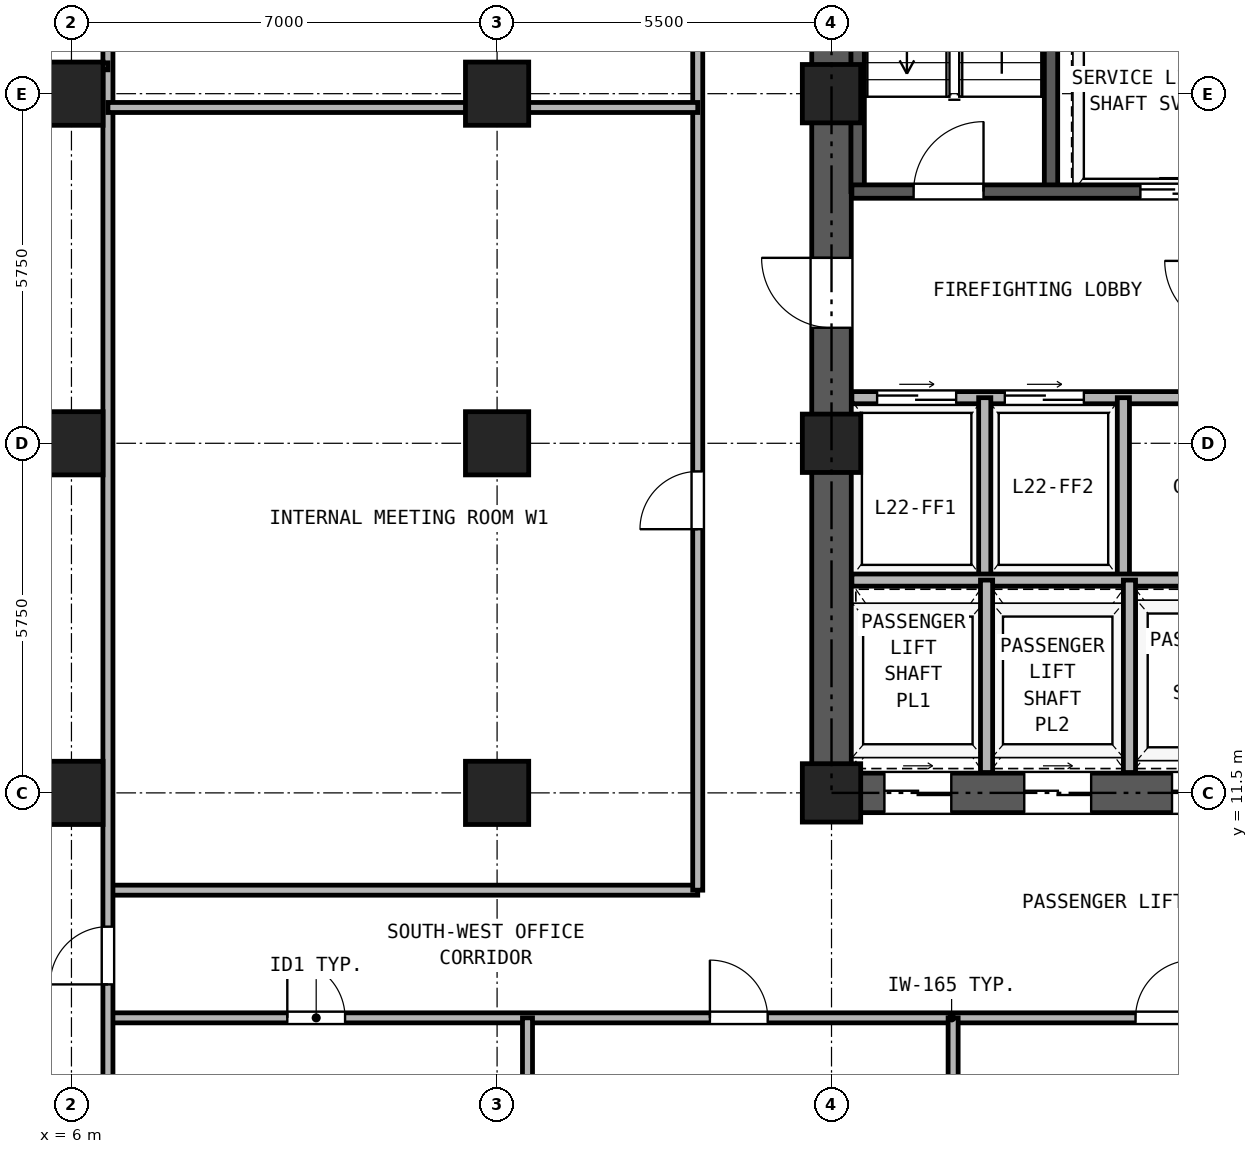
"""IFC4 building model, lengths in metres.
Left out: names, types, materials, properties, quantities, classifications, styles, units other than length and angle.
Written with IfcOpenShell. Run it as: python <this file> out.ifc"""

import sys

from ifc_helpers import new_model, si_unit, direction, frame, frame_2d, origin, origin_2d, place, context, subcontext, project, spatial, rectangle, hollow_rectangle, extrude, source, transform, mapped, element, fill, save


model = new_model("IFC4")
c1 = context("Model", 3, precision=1e-05, world=origin(), true_north=direction((0.0, 1.0)))
c2 = subcontext(c1, "Body", "Model", "MODEL_VIEW")
j1 = project(units=[si_unit("LENGTHUNIT", "METRE"), si_unit("PLANEANGLEUNIT", "RADIAN")], contexts=[c1])
p1 = place(None, origin())
s1 = spatial("IfcSite", under=j1, at=p1, CompositionType="ELEMENT")
p2 = place(p1, origin())
s2 = spatial("IfcBuilding", under=s1, at=p2, CompositionType="ELEMENT")
p3 = place(p2, frame((0.0, 0.0, 84.6)))
s3 = spatial("IfcBuildingStorey", under=s2, at=p3, CompositionType="ELEMENT", Elevation=84.6)
m1 = source(origin(), c2, "Body", "SweptSolid", [
    extrude(hollow_rectangle(XDim=1.04, YDim=1.04, WallThickness=0.065, at=origin_2d()), origin(), (0.0, 0.0, 1.0), 3.24),
])
for number, where, z_axis, x_axis in (
    (1, (6.0, 11.5, 0.0), (0.0, 0.0, 1.0), (1.0, 0.0, 0.0)),
    (2, (6.0, 17.25, 0.0), (0.0, 0.0, 1.0), (1.0, 0.0, 0.0)),
    (3, (6.0, 23.0, 0.0), (0.0, 0.0, 1.0), (1.0, 0.0, 0.0)),
    (4, (13.0, 11.5, 0.0), (0.0, 0.0, 1.0), (1.0, 0.0, 0.0)),
    (5, (13.0, 17.25, 0.0), (0.0, 0.0, 1.0), (1.0, 0.0, 0.0)),
    (6, (13.0, 23.0, 0.0), (0.0, 0.0, 1.0), (1.0, 0.0, 0.0)),
):
    element("IfcColumn", number, at=place(p3, frame(where, z_axis=z_axis, x_axis=x_axis)), inside=s3, PredefinedType="COLUMN", context=c2, shape_type="MappedRepresentation", body=[
        mapped(m1, transform((0.0, 0.0, 0.0), x_axis=(1.0, 0.0, 0.0), y_axis=(0.0, 1.0, 0.0), z_axis=(0.0, 0.0, 1.0), scale=1.0)),
    ])
m2 = source(origin(), c2, "Body", "SweptSolid", [
    extrude(hollow_rectangle(XDim=0.96, YDim=0.96, WallThickness=0.06, at=origin_2d()), origin(), (0.0, 0.0, 1.0), 3.24),
])
for number, where, z_axis, x_axis in (
    (7, (18.5, 11.5, 0.0), (0.0, 0.0, 1.0), (1.0, 0.0, 0.0)),
    (8, (18.5, 17.25, 0.0), (0.0, 0.0, 1.0), (1.0, 0.0, 0.0)),
    (9, (18.5, 23.0, 0.0), (0.0, 0.0, 1.0), (1.0, 0.0, 0.0)),
):
    element("IfcColumn", number, at=place(p3, frame(where, z_axis=z_axis, x_axis=x_axis)), inside=s3, PredefinedType="COLUMN", context=c2, shape_type="MappedRepresentation", body=[
        mapped(m2, transform((0.0, 0.0, 0.0), x_axis=(1.0, 0.0, 0.0), y_axis=(0.0, 1.0, 0.0), z_axis=(0.0, 0.0, 1.0), scale=1.0)),
    ])
p4 = place(p3, frame((18.175, 11.5, 0.0), z_axis=(0.0, 0.0, 1.0), x_axis=(1.0, 0.0, 0.0)))
e10 = element("IfcWall", 10, at=p4, inside=s3, PredefinedType="SHEAR", context=c2, shape_type="SweptSolid", body=[
    extrude(rectangle(XDim=10.65, YDim=0.65, at=frame_2d((5.325, 0.0))), origin(), (0.0, 0.0, 1.0), 3.24),
])
p5 = place(p4, frame((1.195, 0.0, 0.0)))
e11 = element("IfcOpeningElement", 11, at=p5, cuts=e10, PredefinedType="OPENING", context=c2, shape_type="SweptSolid", body=[
    extrude(rectangle(XDim=1.1, YDim=2.25, at=frame_2d((0.55, 1.125))), frame((0.0, 0.335, 0.0), z_axis=(0.0, -1.0, 0.0), x_axis=(1.0, 0.0, 0.0)), (0.0, 0.0, 1.0), 0.67),
])
p6 = place(p4, frame((3.495, 0.0, 0.0)))
e12 = element("IfcOpeningElement", 12, at=p6, cuts=e10, PredefinedType="OPENING", context=c2, shape_type="SweptSolid", body=[
    extrude(rectangle(XDim=1.1, YDim=2.25, at=frame_2d((0.55, 1.125))), frame((0.0, 0.335, 0.0), z_axis=(0.0, -1.0, 0.0), x_axis=(1.0, 0.0, 0.0)), (0.0, 0.0, 1.0), 0.67),
])
p7 = place(p4, frame((5.925, 0.0, 0.0)))
e13 = element("IfcOpeningElement", 13, at=p7, cuts=e10, PredefinedType="OPENING", context=c2, shape_type="SweptSolid", body=[
    extrude(rectangle(XDim=1.1, YDim=2.25, at=frame_2d((0.55, 1.125))), frame((0.0, 0.335, 0.0), z_axis=(0.0, -1.0, 0.0), x_axis=(1.0, 0.0, 0.0)), (0.0, 0.0, 1.0), 0.67),
])
p8 = place(p4, frame((8.325, 0.0, 0.0)))
e14 = element("IfcOpeningElement", 14, at=p8, cuts=e10, PredefinedType="OPENING", context=c2, shape_type="SweptSolid", body=[
    extrude(rectangle(XDim=1.1, YDim=2.25, at=frame_2d((0.55, 1.125))), frame((0.0, 0.335, 0.0), z_axis=(0.0, -1.0, 0.0), x_axis=(1.0, 0.0, 0.0)), (0.0, 0.0, 1.0), 0.67),
])
p9 = place(p3, frame((18.5, 11.825, 0.0), z_axis=(0.0, 0.0, 1.0), x_axis=(0.0, 1.0, 0.0)))
e15 = element("IfcWall", 15, at=p9, inside=s3, PredefinedType="SHEAR", context=c2, shape_type="SweptSolid", body=[
    extrude(rectangle(XDim=16.6, YDim=0.65, at=frame_2d((8.3, 0.0))), origin(), (0.0, 0.0, 1.0), 3.24),
])
p10 = place(p9, frame((7.325, 0.0, 0.0)))
e16 = element("IfcOpeningElement", 16, at=p10, cuts=e15, PredefinedType="OPENING", context=c2, shape_type="SweptSolid", body=[
    extrude(rectangle(XDim=1.15, YDim=2.2, at=frame_2d((0.575, 1.1))), frame((0.0, 0.335, 0.0), z_axis=(0.0, -1.0, 0.0), x_axis=(1.0, 0.0, 0.0)), (0.0, 0.0, 1.0), 0.67),
])
for number, where, z_axis, x_axis in (
    (17, (18.93, 21.39, 0.0), (0.0, 0.0, 1.0), (0.0, 1.0, 0.0)),
    (18, (22.11, 21.39, 0.0), (0.0, 0.0, 1.0), (0.0, 1.0, 0.0)),
):
    element("IfcWall", number, at=place(p3, frame(where, z_axis=z_axis, x_axis=x_axis)), inside=s3, PredefinedType="SOLIDWALL", context=c2, shape_type="SweptSolid", body=[
        extrude(rectangle(XDim=7.11, YDim=0.22, at=frame_2d((3.555, 0.0))), origin(), (0.0, 0.0, 1.0), 3.24),
    ])
p11 = place(p3, frame((18.835, 21.39, 0.0), z_axis=(0.0, 0.0, 1.0), x_axis=(1.0, 0.0, 0.0)))
e19 = element("IfcWall", 19, at=p11, inside=s3, PredefinedType="SOLIDWALL", context=c2, shape_type="SweptSolid", body=[
    extrude(rectangle(XDim=6.295, YDim=0.22, at=frame_2d((3.147, 0.0))), origin(), (0.0, 0.0, 1.0), 3.24),
])
p12 = place(p11, frame((1.015, 0.0, 0.0)))
e20 = element("IfcOpeningElement", 20, at=p12, cuts=e19, PredefinedType="OPENING", context=c2, shape_type="SweptSolid", body=[
    extrude(rectangle(XDim=1.15, YDim=2.2, at=frame_2d((0.575, 1.1))), frame((0.0, 0.12, 0.0), z_axis=(0.0, -1.0, 0.0), x_axis=(1.0, 0.0, 0.0)), (0.0, 0.0, 1.0), 0.24),
])
p13 = place(p11, frame((4.745, 0.0, 0.0)))
e21 = element("IfcOpeningElement", 21, at=p13, cuts=e19, PredefinedType="OPENING", context=c2, shape_type="SweptSolid", body=[
    extrude(rectangle(XDim=1.1, YDim=2.25, at=frame_2d((0.55, 1.125))), frame((0.0, 0.12, 0.0), z_axis=(0.0, -1.0, 0.0), x_axis=(1.0, 0.0, 0.0)), (0.0, 0.0, 1.0), 0.24),
])
p14 = place(p3, frame((18.835, 18.0, 0.0), z_axis=(0.0, 0.0, 1.0), x_axis=(1.0, 0.0, 0.0)))
e22 = element("IfcWall", 22, at=p14, inside=s3, PredefinedType="PARTITIONING", context=c2, shape_type="SweptSolid", body=[
    extrude(rectangle(XDim=9.33, YDim=0.2, at=frame_2d((4.665, 0.0))), origin(), (0.0, 0.0, 1.0), 3.24),
])
p15 = place(p14, frame((0.415, 0.0, 0.0)))
e23 = element("IfcOpeningElement", 23, at=p15, cuts=e22, PredefinedType="OPENING", context=c2, shape_type="SweptSolid", body=[
    extrude(rectangle(XDim=1.3, YDim=2.3, at=frame_2d((0.65, 1.15))), frame((0.0, 0.11, 0.0), z_axis=(0.0, -1.0, 0.0), x_axis=(1.0, 0.0, 0.0)), (0.0, 0.0, 1.0), 0.22),
])
p16 = place(p14, frame((2.515, 0.0, 0.0)))
e24 = element("IfcOpeningElement", 24, at=p16, cuts=e22, PredefinedType="OPENING", context=c2, shape_type="SweptSolid", body=[
    extrude(rectangle(XDim=1.3, YDim=2.3, at=frame_2d((0.65, 1.15))), frame((0.0, 0.11, 0.0), z_axis=(0.0, -1.0, 0.0), x_axis=(1.0, 0.0, 0.0)), (0.0, 0.0, 1.0), 0.22),
])
p17 = place(p14, frame((7.015, 0.0, 0.0)))
e25 = element("IfcOpeningElement", 25, at=p17, cuts=e22, PredefinedType="OPENING", context=c2, shape_type="SweptSolid", body=[
    extrude(rectangle(XDim=1.0, YDim=2.15, at=frame_2d((0.5, 1.075))), frame((0.0, 0.11, 0.0), z_axis=(0.0, -1.0, 0.0), x_axis=(1.0, 0.0, 0.0)), (0.0, 0.0, 1.0), 0.22),
])
for number, where, z_axis, x_axis in (
    (26, (21.02, 15.0, 0.0), (0.0, 0.0, 1.0), (0.0, 1.0, 0.0)),
    (27, (23.3, 15.0, 0.0), (0.0, 0.0, 1.0), (0.0, 1.0, 0.0)),
):
    element("IfcWall", number, at=place(p3, frame(where, z_axis=z_axis, x_axis=x_axis)), inside=s3, PredefinedType="PARTITIONING", context=c2, shape_type="SweptSolid", body=[
        extrude(rectangle(XDim=3.0, YDim=0.2, at=frame_2d((1.5, 0.0))), origin(), (0.0, 0.0, 1.0), 3.24),
    ])
p18 = place(p3, frame((18.835, 15.0, 0.0), z_axis=(0.0, 0.0, 1.0), x_axis=(1.0, 0.0, 0.0)))
e28 = element("IfcWall", 28, at=p18, inside=s3, PredefinedType="PARTITIONING", context=c2, shape_type="SweptSolid", body=[
    extrude(rectangle(XDim=9.33, YDim=0.2, at=frame_2d((4.665, 0.0))), origin(), (0.0, 0.0, 1.0), 3.24),
])
for number, where, z_axis, x_axis in (
    (29, (21.05, 11.835, 0.0), (0.0, 0.0, 1.0), (0.0, 1.0, 0.0)),
    (30, (23.4, 11.835, 0.0), (0.0, 0.0, 1.0), (0.0, 1.0, 0.0)),
):
    element("IfcWall", number, at=place(p3, frame(where, z_axis=z_axis, x_axis=x_axis)), inside=s3, PredefinedType="PARTITIONING", context=c2, shape_type="SweptSolid", body=[
        extrude(rectangle(XDim=3.165, YDim=0.2, at=frame_2d((1.583, 0.0))), origin(), (0.0, 0.0, 1.0), 3.24),
    ])
p19 = place(p3, frame((6.6, 7.8, 0.0), z_axis=(0.0, 0.0, 1.0), x_axis=(1.0, 0.0, 0.0)))
e31 = element("IfcWall", 31, at=p19, inside=s3, PredefinedType="PARTITIONING", context=c2, shape_type="SweptSolid", body=[
    extrude(rectangle(XDim=33.8, YDim=0.165, at=frame_2d((16.9, 0.0))), origin(), (0.0, 0.0, 1.0), 3.24),
])
p20 = place(p19, frame((2.95, 0.0, 0.0)))
e32 = element("IfcOpeningElement", 32, at=p20, cuts=e31, PredefinedType="OPENING", context=c2, shape_type="SweptSolid", body=[
    extrude(rectangle(XDim=0.95, YDim=2.15, at=frame_2d((0.475, 1.075))), frame((0.0, 0.093, 0.0), z_axis=(0.0, -1.0, 0.0), x_axis=(1.0, 0.0, 0.0)), (0.0, 0.0, 1.0), 0.185),
])
p21 = place(p19, frame((9.9, 0.0, 0.0)))
e33 = element("IfcOpeningElement", 33, at=p21, cuts=e31, PredefinedType="OPENING", context=c2, shape_type="SweptSolid", body=[
    extrude(rectangle(XDim=0.95, YDim=2.15, at=frame_2d((0.475, 1.075))), frame((0.0, 0.093, 0.0), z_axis=(0.0, -1.0, 0.0), x_axis=(1.0, 0.0, 0.0)), (0.0, 0.0, 1.0), 0.185),
])
p22 = place(p19, frame((16.9, 0.0, 0.0)))
e34 = element("IfcOpeningElement", 34, at=p22, cuts=e31, PredefinedType="OPENING", context=c2, shape_type="SweptSolid", body=[
    extrude(rectangle(XDim=0.95, YDim=2.15, at=frame_2d((0.475, 1.075))), frame((0.0, 0.093, 0.0), z_axis=(0.0, -1.0, 0.0), x_axis=(1.0, 0.0, 0.0)), (0.0, 0.0, 1.0), 0.185),
])
p23 = place(p19, frame((23.4, 0.0, 0.0)))
e35 = element("IfcOpeningElement", 35, at=p23, cuts=e31, PredefinedType="OPENING", context=c2, shape_type="SweptSolid", body=[
    extrude(rectangle(XDim=0.95, YDim=2.15, at=frame_2d((0.475, 1.075))), frame((0.0, 0.093, 0.0), z_axis=(0.0, -1.0, 0.0), x_axis=(1.0, 0.0, 0.0)), (0.0, 0.0, 1.0), 0.185),
])
p24 = place(p19, frame((28.25, 0.0, 0.0)))
e36 = element("IfcOpeningElement", 36, at=p24, cuts=e31, PredefinedType="OPENING", context=c2, shape_type="SweptSolid", body=[
    extrude(rectangle(XDim=0.92, YDim=2.1, at=frame_2d((0.46, 1.05))), frame((0.0, 0.093, 0.0), z_axis=(0.0, -1.0, 0.0), x_axis=(1.0, 0.0, 0.0)), (0.0, 0.0, 1.0), 0.185),
])
p25 = place(p19, frame((31.7, 0.0, 0.0)))
e37 = element("IfcOpeningElement", 37, at=p25, cuts=e31, PredefinedType="OPENING", context=c2, shape_type="SweptSolid", body=[
    extrude(rectangle(XDim=0.92, YDim=2.1, at=frame_2d((0.46, 1.05))), frame((0.0, 0.093, 0.0), z_axis=(0.0, -1.0, 0.0), x_axis=(1.0, 0.0, 0.0)), (0.0, 0.0, 1.0), 0.185),
])
p26 = place(p3, frame((6.6, 9.9, 0.0), z_axis=(0.0, 0.0, 1.0), x_axis=(1.0, 0.0, 0.0)))
e38 = element("IfcWall", 38, at=p26, inside=s3, PredefinedType="PARTITIONING", context=c2, shape_type="SweptSolid", body=[
    extrude(rectangle(XDim=9.7, YDim=0.165, at=frame_2d((4.85, 0.0))), origin(), (0.0, 0.0, 1.0), 3.24),
])
p27 = place(p3, frame((16.3, 9.9, 0.0), z_axis=(0.0, 0.0, 1.0), x_axis=(0.0, 1.0, 0.0)))
e39 = element("IfcWall", 39, at=p27, inside=s3, PredefinedType="PARTITIONING", context=c2, shape_type="SweptSolid", body=[
    extrude(rectangle(XDim=19.95, YDim=0.165, at=frame_2d((9.975, 0.0))), origin(), (0.0, 0.0, 1.0), 3.24),
])
p28 = place(p27, frame((5.937, 0.0, 0.0)))
e40 = element("IfcOpeningElement", 40, at=p28, cuts=e39, PredefinedType="OPENING", context=c2, shape_type="SweptSolid", body=[
    extrude(rectangle(XDim=0.95, YDim=2.15, at=frame_2d((0.475, 1.075))), frame((0.0, 0.093, 0.0), z_axis=(0.0, -1.0, 0.0), x_axis=(1.0, 0.0, 0.0)), (0.0, 0.0, 1.0), 0.185),
])
p29 = place(p27, frame((15.911, 0.0, 0.0)))
e41 = element("IfcOpeningElement", 41, at=p29, cuts=e39, PredefinedType="OPENING", context=c2, shape_type="SweptSolid", body=[
    extrude(rectangle(XDim=0.95, YDim=2.15, at=frame_2d((0.475, 1.075))), frame((0.0, 0.093, 0.0), z_axis=(0.0, -1.0, 0.0), x_axis=(1.0, 0.0, 0.0)), (0.0, 0.0, 1.0), 0.185),
])
p30 = place(p3, frame((6.6, 0.16, 0.0), z_axis=(0.0, 0.0, 1.0), x_axis=(0.0, 1.0, 0.0)))
e42 = element("IfcWall", 42, at=p30, inside=s3, PredefinedType="PARTITIONING", context=c2, shape_type="SweptSolid", body=[
    extrude(rectangle(XDim=40.18, YDim=0.165, at=frame_2d((20.09, 0.0))), origin(), (0.0, 0.0, 1.0), 3.24),
])
p31 = place(p30, frame((8.19, 0.0, 0.0)))
e43 = element("IfcOpeningElement", 43, at=p31, cuts=e42, PredefinedType="OPENING", context=c2, shape_type="SweptSolid", body=[
    extrude(rectangle(XDim=0.95, YDim=2.15, at=frame_2d((0.475, 1.075))), frame((0.0, 0.093, 0.0), z_axis=(0.0, -1.0, 0.0), x_axis=(1.0, 0.0, 0.0)), (0.0, 0.0, 1.0), 0.185),
])
p32 = place(p30, frame((30.24, 0.0, 0.0)))
e44 = element("IfcOpeningElement", 44, at=p32, cuts=e42, PredefinedType="OPENING", context=c2, shape_type="SweptSolid", body=[
    extrude(rectangle(XDim=0.95, YDim=2.15, at=frame_2d((0.475, 1.075))), frame((0.0, 0.093, 0.0), z_axis=(0.0, -1.0, 0.0), x_axis=(1.0, 0.0, 0.0)), (0.0, 0.0, 1.0), 0.185),
])
for number, where, z_axis, x_axis in (
    (45, (13.5, 0.16, 0.0), (0.0, 0.0, 1.0), (0.0, 1.0, 0.0)),
    (46, (20.5, 0.16, 0.0), (0.0, 0.0, 1.0), (0.0, 1.0, 0.0)),
):
    element("IfcWall", number, at=place(p3, frame(where, z_axis=z_axis, x_axis=x_axis)), inside=s3, PredefinedType="PARTITIONING", context=c2, shape_type="SweptSolid", body=[
        extrude(rectangle(XDim=7.64, YDim=0.165, at=frame_2d((3.82, 0.0))), origin(), (0.0, 0.0, 1.0), 3.24),
    ])
p33 = place(p3, frame((0.16, 23.45, 0.0), z_axis=(0.0, 0.0, 1.0), x_axis=(1.0, 0.0, 0.0)))
e47 = element("IfcWall", 47, at=p33, inside=s3, PredefinedType="PARTITIONING", context=c2, shape_type="SweptSolid", body=[
    extrude(rectangle(XDim=6.44, YDim=0.115, at=frame_2d((3.22, 0.0))), origin(), (0.0, 0.0, 1.0), 3.24),
])
p34 = place(p3, frame((6.6, 22.773, 0.0), z_axis=(0.0, 0.0, 1.0), x_axis=(1.0, 0.0, 0.0)))
e48 = element("IfcWall", 48, at=p34, inside=s3, PredefinedType="PARTITIONING", context=c2, shape_type="SweptSolid", body=[
    extrude(rectangle(XDim=9.7, YDim=0.165, at=frame_2d((4.85, 0.0))), origin(), (0.0, 0.0, 1.0), 2.459),
])
p35 = place(p12, frame((1.15, 0.0, 0.0), z_axis=(0.0, 0.0, 1.0), x_axis=(-1.0, 0.0, 0.0)))
e49 = element("IfcDoor", 49, at=p35, inside=s3, OperationType="SINGLE_SWING_RIGHT", PredefinedType="DOOR", context=c2, shape_type="SweptSolid", body=[
    extrude(rectangle(XDim=1.15, YDim=2.2, at=frame_2d((0.575, 1.1))), frame((0.0, 0.025, 0.0), z_axis=(0.0, -1.0, 0.0), x_axis=(1.0, 0.0, 0.0)), (0.0, 0.0, 1.0), 0.05),
])
fill(e20, e49)
p36 = place(p13, frame((1.1, 0.0, 0.0), z_axis=(0.0, 0.0, 1.0), x_axis=(-1.0, 0.0, 0.0)))
e50 = element("IfcDoor", 50, at=p36, inside=s3, OperationType="DOUBLE_DOOR_SLIDING", PredefinedType="DOOR", context=c2, shape_type="SweptSolid", body=[
    extrude(rectangle(XDim=1.1, YDim=2.25, at=frame_2d((0.55, 1.125))), frame((0.0, 0.025, 0.0), z_axis=(0.0, -1.0, 0.0), x_axis=(1.0, 0.0, 0.0)), (0.0, 0.0, 1.0), 0.05),
])
fill(e21, e50)
p37 = place(p15, origin())
e51 = element("IfcDoor", 51, at=p37, inside=s3, OperationType="DOUBLE_DOOR_SLIDING", PredefinedType="DOOR", context=c2, shape_type="SweptSolid", body=[
    extrude(rectangle(XDim=1.3, YDim=2.3, at=frame_2d((0.65, 1.15))), frame((0.0, 0.025, 0.0), z_axis=(0.0, -1.0, 0.0), x_axis=(1.0, 0.0, 0.0)), (0.0, 0.0, 1.0), 0.05),
])
fill(e23, e51)
p38 = place(p16, origin())
e52 = element("IfcDoor", 52, at=p38, inside=s3, OperationType="DOUBLE_DOOR_SLIDING", PredefinedType="DOOR", context=c2, shape_type="SweptSolid", body=[
    extrude(rectangle(XDim=1.3, YDim=2.3, at=frame_2d((0.65, 1.15))), frame((0.0, 0.025, 0.0), z_axis=(0.0, -1.0, 0.0), x_axis=(1.0, 0.0, 0.0)), (0.0, 0.0, 1.0), 0.05),
])
fill(e24, e52)
p39 = place(p10, frame((1.15, 0.0, 0.0), z_axis=(0.0, 0.0, 1.0), x_axis=(-1.0, 0.0, 0.0)))
e53 = element("IfcDoor", 53, at=p39, inside=s3, OperationType="SINGLE_SWING_RIGHT", PredefinedType="DOOR", context=c2, shape_type="SweptSolid", body=[
    extrude(rectangle(XDim=1.15, YDim=2.2, at=frame_2d((0.575, 1.1))), frame((0.0, 0.025, 0.0), z_axis=(0.0, -1.0, 0.0), x_axis=(1.0, 0.0, 0.0)), (0.0, 0.0, 1.0), 0.05),
])
fill(e16, e53)
p40 = place(p5, frame((1.1, 0.0, 0.0), z_axis=(0.0, 0.0, 1.0), x_axis=(-1.0, 0.0, 0.0)))
e54 = element("IfcDoor", 54, at=p40, inside=s3, OperationType="DOUBLE_DOOR_SLIDING", PredefinedType="DOOR", context=c2, shape_type="SweptSolid", body=[
    extrude(rectangle(XDim=1.1, YDim=2.25, at=frame_2d((0.55, 1.125))), frame((0.0, 0.025, 0.0), z_axis=(0.0, -1.0, 0.0), x_axis=(1.0, 0.0, 0.0)), (0.0, 0.0, 1.0), 0.05),
])
fill(e11, e54)
p41 = place(p6, frame((1.1, 0.0, 0.0), z_axis=(0.0, 0.0, 1.0), x_axis=(-1.0, 0.0, 0.0)))
e55 = element("IfcDoor", 55, at=p41, inside=s3, OperationType="DOUBLE_DOOR_SLIDING", PredefinedType="DOOR", context=c2, shape_type="SweptSolid", body=[
    extrude(rectangle(XDim=1.1, YDim=2.25, at=frame_2d((0.55, 1.125))), frame((0.0, 0.025, 0.0), z_axis=(0.0, -1.0, 0.0), x_axis=(1.0, 0.0, 0.0)), (0.0, 0.0, 1.0), 0.05),
])
fill(e12, e55)
p42 = place(p7, frame((1.1, 0.0, 0.0), z_axis=(0.0, 0.0, 1.0), x_axis=(-1.0, 0.0, 0.0)))
e56 = element("IfcDoor", 56, at=p42, inside=s3, OperationType="DOUBLE_DOOR_SLIDING", PredefinedType="DOOR", context=c2, shape_type="SweptSolid", body=[
    extrude(rectangle(XDim=1.1, YDim=2.25, at=frame_2d((0.55, 1.125))), frame((0.0, 0.025, 0.0), z_axis=(0.0, -1.0, 0.0), x_axis=(1.0, 0.0, 0.0)), (0.0, 0.0, 1.0), 0.05),
])
fill(e13, e56)
p43 = place(p20, frame((0.95, 0.0, 0.0), z_axis=(0.0, 0.0, 1.0), x_axis=(-1.0, 0.0, 0.0)))
e57 = element("IfcDoor", 57, at=p43, inside=s3, OperationType="SINGLE_SWING_LEFT", PredefinedType="DOOR", context=c2, shape_type="SweptSolid", body=[
    extrude(rectangle(XDim=0.95, YDim=2.15, at=frame_2d((0.475, 1.075))), frame((0.0, 0.025, 0.0), z_axis=(0.0, -1.0, 0.0), x_axis=(1.0, 0.0, 0.0)), (0.0, 0.0, 1.0), 0.05),
])
fill(e32, e57)
p44 = place(p21, frame((0.95, 0.0, 0.0), z_axis=(0.0, 0.0, 1.0), x_axis=(-1.0, 0.0, 0.0)))
e58 = element("IfcDoor", 58, at=p44, inside=s3, OperationType="SINGLE_SWING_LEFT", PredefinedType="DOOR", context=c2, shape_type="SweptSolid", body=[
    extrude(rectangle(XDim=0.95, YDim=2.15, at=frame_2d((0.475, 1.075))), frame((0.0, 0.025, 0.0), z_axis=(0.0, -1.0, 0.0), x_axis=(1.0, 0.0, 0.0)), (0.0, 0.0, 1.0), 0.05),
])
fill(e33, e58)
p45 = place(p22, frame((0.95, 0.0, 0.0), z_axis=(0.0, 0.0, 1.0), x_axis=(-1.0, 0.0, 0.0)))
e59 = element("IfcDoor", 59, at=p45, inside=s3, OperationType="SINGLE_SWING_RIGHT", PredefinedType="DOOR", context=c2, shape_type="SweptSolid", body=[
    extrude(rectangle(XDim=0.95, YDim=2.15, at=frame_2d((0.475, 1.075))), frame((0.0, 0.025, 0.0), z_axis=(0.0, -1.0, 0.0), x_axis=(1.0, 0.0, 0.0)), (0.0, 0.0, 1.0), 0.05),
])
fill(e34, e59)
p46 = place(p31, frame((0.95, 0.0, 0.0), z_axis=(0.0, 0.0, 1.0), x_axis=(-1.0, 0.0, 0.0)))
e60 = element("IfcDoor", 60, at=p46, inside=s3, OperationType="SINGLE_SWING_LEFT", PredefinedType="DOOR", context=c2, shape_type="SweptSolid", body=[
    extrude(rectangle(XDim=0.95, YDim=2.15, at=frame_2d((0.475, 1.075))), frame((0.0, 0.025, 0.0), z_axis=(0.0, -1.0, 0.0), x_axis=(1.0, 0.0, 0.0)), (0.0, 0.0, 1.0), 0.05),
])
fill(e43, e60)
p47 = place(p28, frame((0.95, 0.0, 0.0), z_axis=(0.0, 0.0, 1.0), x_axis=(-1.0, 0.0, 0.0)))
e61 = element("IfcDoor", 61, at=p47, inside=s3, OperationType="SINGLE_SWING_LEFT", PredefinedType="DOOR", context=c2, shape_type="SweptSolid", body=[
    extrude(rectangle(XDim=0.95, YDim=2.15, at=frame_2d((0.475, 1.075))), frame((0.0, 0.025, 0.0), z_axis=(0.0, -1.0, 0.0), x_axis=(1.0, 0.0, 0.0)), (0.0, 0.0, 1.0), 0.05),
])
fill(e40, e61)
save(model, sys.argv[1])
